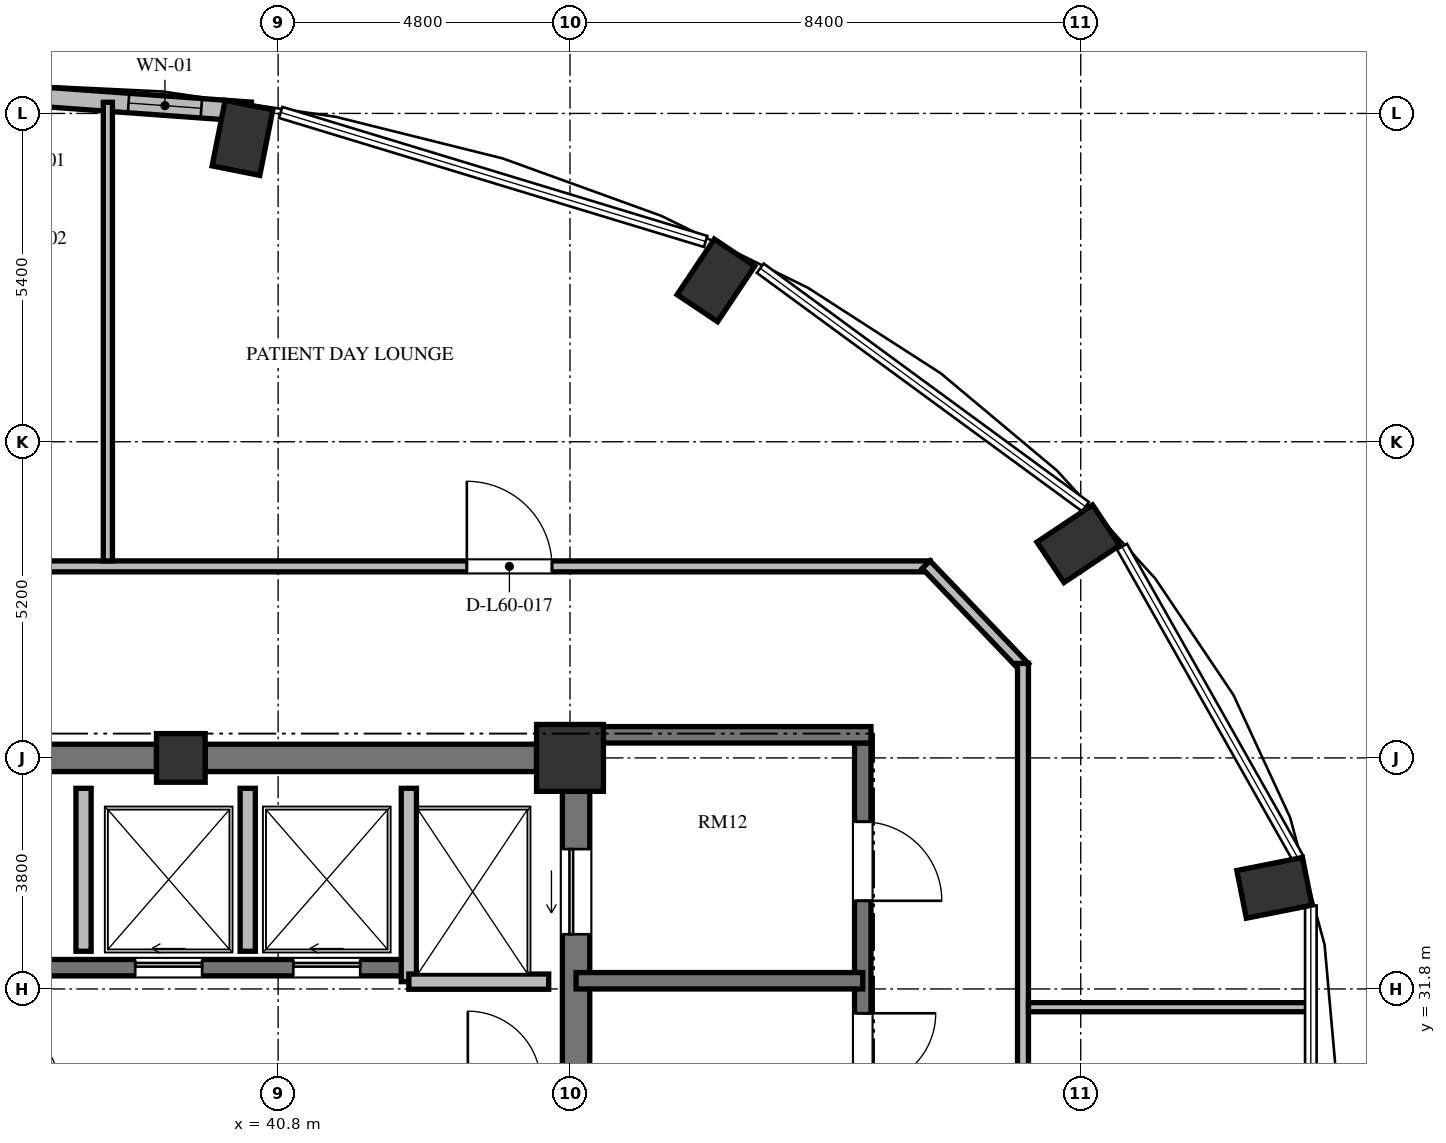
"""IFC4 building model, lengths in metres.
Left out: names, types, materials, properties, quantities, classifications, styles, units other than length and angle.
Written with IfcOpenShell. Run it as: python <this file> out.ifc"""

import sys

from ifc_helpers import new_model, si_unit, direction, frame, frame_2d, origin, origin_2d, place, context, subcontext, project, spatial, rectangle, extrude, element, fill, save


model = new_model("IFC4")
c1 = context("Model", 3, precision=1e-05, world=origin(), true_north=direction((0.0, 1.0)))
c2 = subcontext(c1, "Body", "Model", "MODEL_VIEW")
j1 = project(units=[si_unit("LENGTHUNIT", "METRE"), si_unit("PLANEANGLEUNIT", "RADIAN")], contexts=[c1])
p1 = place(None, origin())
s1 = spatial("IfcSite", under=j1, at=p1, CompositionType="ELEMENT")
p2 = place(p1, origin())
s2 = spatial("IfcBuilding", under=s1, at=p2, CompositionType="ELEMENT")
p3 = place(p2, frame((0.0, 0.0, 231.312)))
s3 = spatial("IfcBuildingStorey", under=s2, at=p3, CompositionType="ELEMENT", Elevation=231.312)
for number, where, z_axis, x_axis in (
    (1, (57.185, 33.463, 0.0), (0.0, 0.0, 1.0), (0.981, 0.195, 0.0)),
    (2, (53.96, 39.123, 0.0), (0.0, 0.0, 1.0), (0.831, 0.556, 0.0)),
    (3, (48.0, 43.454, 0.0), (0.0, 0.0, 1.0), (0.556, 0.831, 0.0)),
    (4, (40.214, 45.798, 0.0), (0.0, 0.0, 1.0), (0.195, 0.981, 0.0)),
):
    element("IfcColumn", number, at=place(p3, frame(where, z_axis=z_axis, x_axis=x_axis)), inside=s3, PredefinedType="COLUMN", context=c2, shape_type="SweptSolid", body=[
        extrude(rectangle(XDim=1.1, YDim=0.8, at=origin_2d()), origin(), (0.0, 0.0, 1.0), 3.648),
    ])
p4 = place(p3, frame((45.6, 35.6, 0.0), z_axis=(0.0, 0.0, 1.0), x_axis=(1.0, 0.0, 0.0)))
e5 = element("IfcColumn", 5, at=p4, inside=s3, PredefinedType="COLUMN", context=c2, shape_type="SweptSolid", body=[
    extrude(rectangle(XDim=1.1, YDim=1.1, at=origin_2d()), origin(), (0.0, 0.0, 1.0), 3.648),
])
p5 = place(p3, frame((39.2, 35.6, 0.0), z_axis=(0.0, 0.0, 1.0), x_axis=(1.0, 0.0, 0.0)))
e6 = element("IfcColumn", 6, at=p5, inside=s3, PredefinedType="COLUMN", context=c2, shape_type="SweptSolid", body=[
    extrude(rectangle(XDim=0.8, YDim=0.8, at=origin_2d()), origin(), (0.0, 0.0, 1.0), 3.648),
])
p6 = place(p3, frame((45.7, 20.95, 0.0), z_axis=(0.0, 0.0, 1.0), x_axis=(0.0, 1.0, 0.0)))
e7 = element("IfcWall", 7, at=p6, inside=s3, PredefinedType="SHEAR", context=c2, shape_type="SweptSolid", body=[
    extrude(rectangle(XDim=14.1, YDim=0.45, at=frame_2d((7.05, 0.0))), origin(), (0.0, 0.0, 1.0), 3.648),
])
p7 = place(p6, frame((11.75, 0.0, 0.0)))
e8 = element("IfcOpeningElement", 8, at=p7, cuts=e7, PredefinedType="OPENING", context=c2, shape_type="SweptSolid", body=[
    extrude(rectangle(XDim=1.4, YDim=2.3, at=frame_2d((0.7, 1.15))), frame((0.0, 0.235, 0.0), z_axis=(0.0, -1.0, 0.0), x_axis=(1.0, 0.0, 0.0)), (0.0, 0.0, 1.0), 0.47),
])
p8 = place(p6, frame((0.95, 0.0, 0.0)))
e9 = element("IfcOpeningElement", 9, at=p8, cuts=e7, PredefinedType="OPENING", context=c2, shape_type="SweptSolid", body=[
    extrude(rectangle(XDim=1.4, YDim=2.3, at=frame_2d((0.7, 1.15))), frame((0.0, 0.235, 0.0), z_axis=(0.0, -1.0, 0.0), x_axis=(1.0, 0.0, 0.0)), (0.0, 0.0, 1.0), 0.47),
])
p9 = place(p3, frame((33.2, 35.6, 0.0), z_axis=(0.0, 0.0, 1.0), x_axis=(1.0, 0.0, 0.0)))
e10 = element("IfcWall", 10, at=p9, inside=s3, PredefinedType="SHEAR", context=c2, shape_type="SweptSolid", body=[
    extrude(rectangle(XDim=5.6, YDim=0.45, at=frame_2d((2.8, 0.0))), origin(), (0.0, 0.0, 1.0), 3.648),
])
p10 = place(p3, frame((39.6, 35.6, 0.0), z_axis=(0.0, 0.0, 1.0), x_axis=(1.0, 0.0, 0.0)))
e11 = element("IfcWall", 11, at=p10, inside=s3, PredefinedType="SHEAR", context=c2, shape_type="SweptSolid", body=[
    extrude(rectangle(XDim=5.45, YDim=0.45, at=frame_2d((2.725, 0.0))), origin(), (0.0, 0.0, 1.0), 3.648),
])
p11 = place(p3, frame((40.35, 46.226, 0.0), z_axis=(0.0, 0.0, 1.0), x_axis=(-0.997409061056, 0.071938619141, 0.0)))
e12 = element("IfcWall", 12, at=p11, inside=s3, PredefinedType="SOLIDWALL", context=c2, shape_type="SweptSolid", body=[
    extrude(rectangle(XDim=4.541, YDim=0.32, at=frame_2d((2.271, 0.0))), origin(), (0.0, 0.0, 1.0), 3.448),
])
p12 = place(p11, frame((0.815, 0.0, 0.85)))
e13 = element("IfcOpeningElement", 13, at=p12, cuts=e12, PredefinedType="OPENING", context=c2, shape_type="SweptSolid", body=[
    extrude(rectangle(XDim=1.2, YDim=2.2, at=frame_2d((0.6, 1.1))), frame((0.0, 0.17, 0.0), z_axis=(0.0, -1.0, 0.0), x_axis=(1.0, 0.0, 0.0)), (0.0, 0.0, 1.0), 0.34),
])
p13 = place(p3, frame((26.55, 32.15, 0.0), z_axis=(0.0, 0.0, 1.0), x_axis=(1.0, 0.0, 0.0)))
e14 = element("IfcWall", 14, at=p13, inside=s3, PredefinedType="SHEAR", context=c2, shape_type="SweptSolid", body=[
    extrude(rectangle(XDim=16.4, YDim=0.27, at=frame_2d((8.2, 0.0))), origin(), (0.0, 0.0, 1.0), 3.648),
])
p14 = place(p13, frame((1.375, 0.0, 0.0)))
e15 = element("IfcOpeningElement", 15, at=p14, cuts=e14, PredefinedType="OPENING", context=c2, shape_type="SweptSolid", body=[
    extrude(rectangle(XDim=1.05, YDim=2.15, at=frame_2d((0.525, 1.075))), frame((0.0, 0.145, 0.0), z_axis=(0.0, -1.0, 0.0), x_axis=(1.0, 0.0, 0.0)), (0.0, 0.0, 1.0), 0.29),
])
p15 = place(p13, frame((4.975, 0.0, 0.0)))
e16 = element("IfcOpeningElement", 16, at=p15, cuts=e14, PredefinedType="OPENING", context=c2, shape_type="SweptSolid", body=[
    extrude(rectangle(XDim=1.05, YDim=2.15, at=frame_2d((0.525, 1.075))), frame((0.0, 0.145, 0.0), z_axis=(0.0, -1.0, 0.0), x_axis=(1.0, 0.0, 0.0)), (0.0, 0.0, 1.0), 0.29),
])
p16 = place(p13, frame((8.625, 0.0, 0.0)))
e17 = element("IfcOpeningElement", 17, at=p16, cuts=e14, PredefinedType="OPENING", context=c2, shape_type="SweptSolid", body=[
    extrude(rectangle(XDim=1.05, YDim=2.15, at=frame_2d((0.525, 1.075))), frame((0.0, 0.145, 0.0), z_axis=(0.0, -1.0, 0.0), x_axis=(1.0, 0.0, 0.0)), (0.0, 0.0, 1.0), 0.29),
])
p17 = place(p13, frame((11.9, 0.0, 0.0)))
e18 = element("IfcOpeningElement", 18, at=p17, cuts=e14, PredefinedType="OPENING", context=c2, shape_type="SweptSolid", body=[
    extrude(rectangle(XDim=1.1, YDim=2.2, at=frame_2d((0.55, 1.1))), frame((0.0, 0.145, 0.0), z_axis=(0.0, -1.0, 0.0), x_axis=(1.0, 0.0, 0.0)), (0.0, 0.0, 1.0), 0.29),
])
p18 = place(p13, frame((14.5, 0.0, 0.0)))
e19 = element("IfcOpeningElement", 19, at=p18, cuts=e14, PredefinedType="OPENING", context=c2, shape_type="SweptSolid", body=[
    extrude(rectangle(XDim=1.1, YDim=2.2, at=frame_2d((0.55, 1.1))), frame((0.0, 0.145, 0.0), z_axis=(0.0, -1.0, 0.0), x_axis=(1.0, 0.0, 0.0)), (0.0, 0.0, 1.0), 0.29),
])
p19 = place(p3, frame((42.95, 31.92, 0.0), z_axis=(0.0, 0.0, 1.0), x_axis=(0.0, 1.0, 0.0)))
e20 = element("IfcWall", 20, at=p19, inside=s3, PredefinedType="SOLIDWALL", context=c2, shape_type="SweptSolid", body=[
    extrude(rectangle(XDim=3.18, YDim=0.25, at=frame_2d((1.59, 0.0))), origin(), (0.0, 0.0, 1.0), 3.448),
])
p20 = place(p3, frame((42.95, 31.92, 0.0), z_axis=(0.0, 0.0, 1.0), x_axis=(1.0, 0.0, 0.0)))
e21 = element("IfcWall", 21, at=p20, inside=s3, PredefinedType="SOLIDWALL", context=c2, shape_type="SweptSolid", body=[
    extrude(rectangle(XDim=2.3, YDim=0.25, at=frame_2d((1.15, 0.0))), origin(), (0.0, 0.0, 1.0), 3.448),
])
for number, where, z_axis, x_axis in (
    (22, (37.6, 32.42, 0.0), (0.0, 0.0, 1.0), (0.0, 1.0, 0.0)),
    (23, (40.3, 32.42, 0.0), (0.0, 0.0, 1.0), (0.0, 1.0, 0.0)),
):
    element("IfcWall", number, at=place(p3, frame(where, z_axis=z_axis, x_axis=x_axis)), inside=s3, PredefinedType="SOLIDWALL", context=c2, shape_type="SweptSolid", body=[
        extrude(rectangle(XDim=2.68, YDim=0.25, at=frame_2d((1.34, 0.0))), origin(), (0.0, 0.0, 1.0), 3.448),
    ])
p21 = place(p3, frame((50.415, 35.845, 0.0), z_axis=(0.0, 0.0, 1.0), x_axis=(0.0, -1.0, 0.0)))
e24 = element("IfcWall", 24, at=p21, inside=s3, PredefinedType="SHEAR", context=c2, shape_type="SweptSolid", body=[
    extrude(rectangle(XDim=15.825, YDim=0.27, at=frame_2d((7.913, 0.0))), origin(), (0.0, 0.0, 1.0), 3.648),
])
p22 = place(p21, frame((4.445, 0.0, 0.0)))
e25 = element("IfcOpeningElement", 25, at=p22, cuts=e24, PredefinedType="OPENING", context=c2, shape_type="SweptSolid", body=[
    extrude(rectangle(XDim=1.2, YDim=2.15, at=frame_2d((0.6, 1.075))), frame((0.0, 0.145, 0.0), z_axis=(0.0, -1.0, 0.0), x_axis=(1.0, 0.0, 0.0)), (0.0, 0.0, 1.0), 0.29),
])
p23 = place(p21, frame((1.295, 0.0, 0.0)))
e26 = element("IfcOpeningElement", 26, at=p23, cuts=e24, PredefinedType="OPENING", context=c2, shape_type="SweptSolid", body=[
    extrude(rectangle(XDim=1.3, YDim=2.2, at=frame_2d((0.65, 1.1))), frame((0.0, 0.145, 0.0), z_axis=(0.0, -1.0, 0.0), x_axis=(1.0, 0.0, 0.0)), (0.0, 0.0, 1.0), 0.29),
])
p24 = place(p21, frame((13.095, 0.0, 0.0)))
e27 = element("IfcOpeningElement", 27, at=p24, cuts=e24, PredefinedType="OPENING", context=c2, shape_type="SweptSolid", body=[
    extrude(rectangle(XDim=1.3, YDim=2.2, at=frame_2d((0.65, 1.1))), frame((0.0, 0.145, 0.0), z_axis=(0.0, -1.0, 0.0), x_axis=(1.0, 0.0, 0.0)), (0.0, 0.0, 1.0), 0.29),
])
p25 = place(p3, frame((45.925, 35.98, 0.0), z_axis=(0.0, 0.0, 1.0), x_axis=(1.0, 0.0, 0.0)))
e28 = element("IfcWall", 28, at=p25, inside=s3, PredefinedType="SHEAR", context=c2, shape_type="SweptSolid", body=[
    extrude(rectangle(XDim=4.625, YDim=0.27, at=frame_2d((2.312, 0.0))), origin(), (0.0, 0.0, 1.0), 3.648),
])
p26 = place(p3, frame((45.7, 31.935, 0.0), z_axis=(0.0, 0.0, 1.0), x_axis=(1.0, 0.0, 0.0)))
e29 = element("IfcWall", 29, at=p26, inside=s3, PredefinedType="SHEAR", context=c2, shape_type="SweptSolid", body=[
    extrude(rectangle(XDim=4.715, YDim=0.27, at=frame_2d((2.357, 0.0))), origin(), (0.0, 0.0, 1.0), 3.648),
])
p27 = place(p3, frame((30.71, 38.75, 0.0), z_axis=(0.0, 0.0, 1.0), x_axis=(1.0, 0.0, 0.0)))
e30 = element("IfcWall", 30, at=p27, inside=s3, PredefinedType="PARTITIONING", context=c2, shape_type="SweptSolid", body=[
    extrude(rectangle(XDim=20.815, YDim=0.18, at=frame_2d((10.408, 0.0))), origin(), (0.0, 0.0, 1.0), 3.073),
])
p28 = place(p27, frame((13.194, 0.0, 0.0)))
e31 = element("IfcOpeningElement", 31, at=p28, cuts=e30, PredefinedType="OPENING", context=c2, shape_type="SweptSolid", body=[
    extrude(rectangle(XDim=1.4, YDim=2.2, at=frame_2d((0.7, 1.1))), frame((0.0, 0.1, 0.0), z_axis=(0.0, -1.0, 0.0), x_axis=(1.0, 0.0, 0.0)), (0.0, 0.0, 1.0), 0.2),
])
p29 = place(p27, frame((3.279, 0.0, 0.0)))
e32 = element("IfcOpeningElement", 32, at=p29, cuts=e30, PredefinedType="OPENING", context=c2, shape_type="SweptSolid", body=[
    extrude(rectangle(XDim=1.05, YDim=2.15, at=frame_2d((0.525, 1.075))), frame((0.0, 0.1, 0.0), z_axis=(0.0, -1.0, 0.0), x_axis=(1.0, 0.0, 0.0)), (0.0, 0.0, 1.0), 0.2),
])
p30 = place(p3, frame((51.458, 38.779, 0.0), z_axis=(0.0, 0.0, 1.0), x_axis=(0.691359830363, -0.722510612352, 0.0)))
e33 = element("IfcWall", 33, at=p30, inside=s3, PredefinedType="PARTITIONING", context=c2, shape_type="SweptSolid", body=[
    extrude(rectangle(XDim=2.343, YDim=0.18, at=frame_2d((1.172, 0.0))), origin(), (0.0, 0.0, 1.0), 3.033),
])
p31 = place(p3, frame((53.05, 37.155, 0.0), z_axis=(0.0, 0.0, 1.0), x_axis=(0.0, -1.0, 0.0)))
e34 = element("IfcWall", 34, at=p31, inside=s3, PredefinedType="PARTITIONING", context=c2, shape_type="SweptSolid", body=[
    extrude(rectangle(XDim=13.509, YDim=0.18, at=frame_2d((6.754, 0.0))), origin(), (0.0, 0.0, 1.0), 3.448),
])
p32 = place(p31, frame((8.629, 0.0, 0.0)))
e35 = element("IfcOpeningElement", 35, at=p32, cuts=e34, PredefinedType="OPENING", context=c2, shape_type="SweptSolid", body=[
    extrude(rectangle(XDim=1.05, YDim=2.15, at=frame_2d((0.525, 1.075))), frame((0.0, 0.1, 0.0), z_axis=(0.0, -1.0, 0.0), x_axis=(1.0, 0.0, 0.0)), (0.0, 0.0, 1.0), 0.2),
])
p33 = place(p3, frame((53.14, 31.5, 0.0), z_axis=(0.0, 0.0, 1.0), x_axis=(1.0, 0.0, 0.0)))
e36 = element("IfcWall", 36, at=p33, inside=s3, PredefinedType="PARTITIONING", context=c2, shape_type="SweptSolid", body=[
    extrude(rectangle(XDim=4.632, YDim=0.15, at=frame_2d((2.316, 0.0))), origin(), (0.0, 0.0, 1.0), 3.448),
])
p34 = place(p3, frame((38.0, 38.84, 0.0), z_axis=(0.0, 0.0, 1.0), x_axis=(0.0, 1.0, 0.0)))
e37 = element("IfcWall", 37, at=p34, inside=s3, PredefinedType="PARTITIONING", context=c2, shape_type="SweptSolid", body=[
    extrude(rectangle(XDim=7.543, YDim=0.15, at=frame_2d((3.771, 0.0))), origin(), (0.0, 0.0, 1.0), 3.448),
])
p35 = place(p12, origin())
e38 = element("IfcWindow", 38, at=p35, inside=s3, PartitioningType="SINGLE_PANEL", PredefinedType="WINDOW", context=c2, shape_type="SweptSolid", body=[
    extrude(rectangle(XDim=1.2, YDim=2.2, at=frame_2d((0.6, 1.1))), frame((0.0, 0.03, 0.0), z_axis=(0.0, -1.0, 0.0), x_axis=(1.0, 0.0, 0.0)), (0.0, 0.0, 1.0), 0.06),
])
fill(e13, e38)
p36 = place(p17, origin())
e39 = element("IfcDoor", 39, at=p36, inside=s3, OperationType="SLIDING_TO_LEFT", PredefinedType="DOOR", context=c2, shape_type="SweptSolid", body=[
    extrude(rectangle(XDim=1.1, YDim=2.2, at=frame_2d((0.55, 1.1))), frame((0.0, 0.025, 0.0), z_axis=(0.0, -1.0, 0.0), x_axis=(1.0, 0.0, 0.0)), (0.0, 0.0, 1.0), 0.05),
])
fill(e18, e39)
p37 = place(p18, origin())
e40 = element("IfcDoor", 40, at=p37, inside=s3, OperationType="SLIDING_TO_LEFT", PredefinedType="DOOR", context=c2, shape_type="SweptSolid", body=[
    extrude(rectangle(XDim=1.1, YDim=2.2, at=frame_2d((0.55, 1.1))), frame((0.0, 0.025, 0.0), z_axis=(0.0, -1.0, 0.0), x_axis=(1.0, 0.0, 0.0)), (0.0, 0.0, 1.0), 0.05),
])
fill(e19, e40)
p38 = place(p7, origin())
e41 = element("IfcDoor", 41, at=p38, inside=s3, OperationType="SLIDING_TO_LEFT", PredefinedType="DOOR", context=c2, shape_type="SweptSolid", body=[
    extrude(rectangle(XDim=1.4, YDim=2.3, at=frame_2d((0.7, 1.15))), frame((0.0, 0.025, 0.0), z_axis=(0.0, -1.0, 0.0), x_axis=(1.0, 0.0, 0.0)), (0.0, 0.0, 1.0), 0.05),
])
fill(e8, e41)
p39 = place(p22, origin())
e42 = element("IfcDoor", 42, at=p39, inside=s3, OperationType="SINGLE_SWING_LEFT", PredefinedType="DOOR", context=c2, shape_type="SweptSolid", body=[
    extrude(rectangle(XDim=1.2, YDim=2.15, at=frame_2d((0.6, 1.075))), frame((0.0, 0.025, 0.0), z_axis=(0.0, -1.0, 0.0), x_axis=(1.0, 0.0, 0.0)), (0.0, 0.0, 1.0), 0.05),
])
fill(e25, e42)
p40 = place(p23, origin())
e43 = element("IfcDoor", 43, at=p40, inside=s3, OperationType="SINGLE_SWING_RIGHT", PredefinedType="DOOR", context=c2, shape_type="SweptSolid", body=[
    extrude(rectangle(XDim=1.3, YDim=2.2, at=frame_2d((0.65, 1.1))), frame((0.0, 0.025, 0.0), z_axis=(0.0, -1.0, 0.0), x_axis=(1.0, 0.0, 0.0)), (0.0, 0.0, 1.0), 0.05),
])
fill(e26, e43)
p41 = place(p28, origin())
e44 = element("IfcDoor", 44, at=p41, inside=s3, OperationType="SINGLE_SWING_LEFT", PredefinedType="DOOR", context=c2, shape_type="SweptSolid", body=[
    extrude(rectangle(XDim=1.4, YDim=2.2, at=frame_2d((0.7, 1.1))), frame((0.0, 0.025, 0.0), z_axis=(0.0, -1.0, 0.0), x_axis=(1.0, 0.0, 0.0)), (0.0, 0.0, 1.0), 0.05),
])
fill(e31, e44)
save(model, sys.argv[1])
